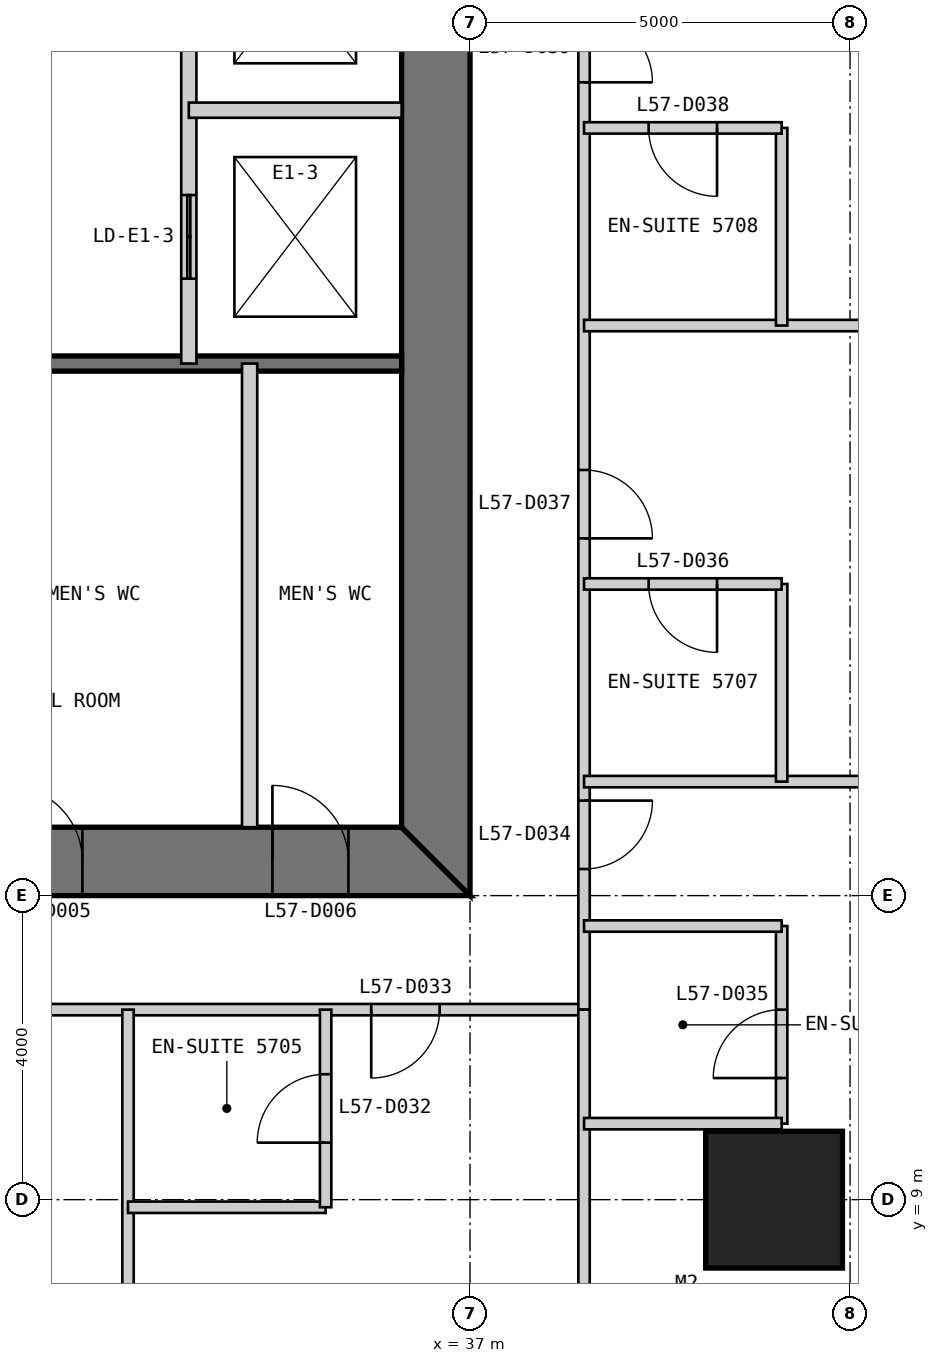
"""IFC4 building model, lengths in metres.
Left out: names, types, materials, properties, quantities, classifications, styles, units other than length and angle.
Written with IfcOpenShell. Run it as: python <this file> out.ifc"""

import sys

from ifc_helpers import new_model, si_unit, direction, frame, frame_2d, origin, origin_2d, place, context, subcontext, project, spatial, polyline, rectangle, outline, extrude, element, fill, save


model = new_model("IFC4")
c1 = context("Model", 3, precision=1e-05, world=origin(), true_north=direction((0.0, 1.0)))
c2 = subcontext(c1, "Body", "Model", "MODEL_VIEW")
j1 = project(units=[si_unit("LENGTHUNIT", "METRE"), si_unit("PLANEANGLEUNIT", "RADIAN")], contexts=[c1])
p1 = place(None, origin())
s1 = spatial("IfcSite", under=j1, at=p1, CompositionType="ELEMENT")
p2 = place(p1, origin())
s2 = spatial("IfcBuilding", under=s1, at=p2, CompositionType="ELEMENT")
p3 = place(p2, frame((0.0, 0.0, 245.8)))
s3 = spatial("IfcBuildingStorey", under=s2, at=p3, CompositionType="ELEMENT", Elevation=245.8)
p4 = place(p3, frame((41.0, 9.0, 0.0), z_axis=(0.0, 0.0, 1.0), x_axis=(1.0, 0.0, 0.0)))
e1 = element("IfcColumn", 1, at=p4, inside=s3, PredefinedType="COLUMN", context=c2, shape_type="SweptSolid", body=[
    extrude(rectangle(XDim=1.8, YDim=1.8, at=origin_2d()), origin(), (0.0, 0.0, 1.0), 3.4),
])
p5 = place(p3, frame((13.0, 13.45, 0.0), z_axis=(0.0, 0.0, 1.0), x_axis=(1.0, 0.0, 0.0)))
e2 = element("IfcWall", 2, at=p5, inside=s3, PredefinedType="SHEAR", context=c2, shape_type="SweptSolid", body=[
    extrude(outline(polyline([(0.0, -0.45), (24.0, -0.45), (23.1, 0.45), (0.9, 0.45), (0.0, -0.45)])), origin(), (0.0, 0.0, 1.0), 3.4),
])
p6 = place(p5, frame((4.9, 0.0, 0.0)))
e3 = element("IfcOpeningElement", 3, at=p6, cuts=e2, PredefinedType="OPENING", context=c2, shape_type="SweptSolid", body=[
    extrude(rectangle(XDim=1.0, YDim=2.2, at=frame_2d((0.5, 1.1))), frame((0.0, 0.46, 0.0), z_axis=(0.0, -1.0, 0.0), x_axis=(1.0, 0.0, 0.0)), (0.0, 0.0, 1.0), 0.92),
])
p7 = place(p5, frame((8.9, 0.0, 0.0)))
e4 = element("IfcOpeningElement", 4, at=p7, cuts=e2, PredefinedType="OPENING", context=c2, shape_type="SweptSolid", body=[
    extrude(rectangle(XDim=1.1, YDim=2.2, at=frame_2d((0.55, 1.1))), frame((0.0, 0.46, 0.0), z_axis=(0.0, -1.0, 0.0), x_axis=(1.0, 0.0, 0.0)), (0.0, 0.0, 1.0), 0.92),
])
p8 = place(p5, frame((15.05, 0.0, 0.0)))
e5 = element("IfcOpeningElement", 5, at=p8, cuts=e2, PredefinedType="OPENING", context=c2, shape_type="SweptSolid", body=[
    extrude(rectangle(XDim=0.9, YDim=2.2, at=frame_2d((0.45, 1.1))), frame((0.0, 0.46, 0.0), z_axis=(0.0, -1.0, 0.0), x_axis=(1.0, 0.0, 0.0)), (0.0, 0.0, 1.0), 0.92),
])
p9 = place(p5, frame((17.9, 0.0, 0.0)))
e6 = element("IfcOpeningElement", 6, at=p9, cuts=e2, PredefinedType="OPENING", context=c2, shape_type="SweptSolid", body=[
    extrude(rectangle(XDim=1.0, YDim=2.2, at=frame_2d((0.5, 1.1))), frame((0.0, 0.46, 0.0), z_axis=(0.0, -1.0, 0.0), x_axis=(1.0, 0.0, 0.0)), (0.0, 0.0, 1.0), 0.92),
])
p10 = place(p5, frame((21.4, 0.0, 0.0)))
e7 = element("IfcOpeningElement", 7, at=p10, cuts=e2, PredefinedType="OPENING", context=c2, shape_type="SweptSolid", body=[
    extrude(rectangle(XDim=1.0, YDim=2.2, at=frame_2d((0.5, 1.1))), frame((0.0, 0.46, 0.0), z_axis=(0.0, -1.0, 0.0), x_axis=(1.0, 0.0, 0.0)), (0.0, 0.0, 1.0), 0.92),
])
p11 = place(p3, frame((36.55, 13.9, 0.0), z_axis=(0.0, 0.0, 1.0), x_axis=(0.0, 1.0, 0.0)))
e8 = element("IfcWall", 8, at=p11, inside=s3, PredefinedType="SHEAR", context=c2, shape_type="SweptSolid", body=[
    extrude(outline(polyline([(-0.9, -0.45), (23.1, -0.45), (22.2, 0.45), (0.0, 0.45), (-0.9, -0.45)])), origin(), (0.0, 0.0, 1.0), 3.4),
])
p12 = place(p11, frame((20.2, 0.0, 0.0)))
e9 = element("IfcOpeningElement", 9, at=p12, cuts=e8, PredefinedType="OPENING", context=c2, shape_type="SweptSolid", body=[
    extrude(rectangle(XDim=1.0, YDim=2.2, at=frame_2d((0.5, 1.1))), frame((0.0, 0.46, 0.0), z_axis=(0.0, -1.0, 0.0), x_axis=(1.0, 0.0, 0.0)), (0.0, 0.0, 1.0), 0.92),
])
p13 = place(p11, frame((17.25, 0.0, 0.0)))
e10 = element("IfcOpeningElement", 10, at=p13, cuts=e8, PredefinedType="OPENING", context=c2, shape_type="SweptSolid", body=[
    extrude(rectangle(XDim=0.9, YDim=2.2, at=frame_2d((0.45, 1.1))), frame((0.0, 0.46, 0.0), z_axis=(0.0, -1.0, 0.0), x_axis=(1.0, 0.0, 0.0)), (0.0, 0.0, 1.0), 0.92),
])
p14 = place(p3, frame((20.3, 20.0, 0.0), z_axis=(0.0, 0.0, 1.0), x_axis=(1.0, 0.0, 0.0)))
e11 = element("IfcWall", 11, at=p14, inside=s3, PredefinedType="SOLIDWALL", context=c2, shape_type="SweptSolid", body=[
    extrude(rectangle(XDim=15.8, YDim=0.2, at=frame_2d((7.9, 0.0))), origin(), (0.0, 0.0, 1.0), 3.2),
])
p15 = place(p3, frame((34.1, 13.9, 0.0), z_axis=(0.0, 0.0, 1.0), x_axis=(0.0, 1.0, 0.0)))
e12 = element("IfcWall", 12, at=p15, inside=s3, PredefinedType="PARTITIONING", context=c2, shape_type="SweptSolid", body=[
    extrude(rectangle(XDim=6.1, YDim=0.2, at=frame_2d((3.05, 0.0))), origin(), (0.0, 0.0, 1.0), 3.2),
])
p16 = place(p3, frame((33.3, 36.1, 0.0), z_axis=(0.0, 0.0, 1.0), x_axis=(0.0, -1.0, 0.0)))
e13 = element("IfcWall", 13, at=p16, inside=s3, PredefinedType="PARTITIONING", context=c2, shape_type="SweptSolid", body=[
    extrude(rectangle(XDim=16.1, YDim=0.2, at=frame_2d((8.05, 0.0))), origin(), (0.0, 0.0, 1.0), 3.2),
])
p17 = place(p16, frame((7.217, 0.0, 0.0)))
e14 = element("IfcOpeningElement", 14, at=p17, cuts=e13, PredefinedType="OPENING", context=c2, shape_type="SweptSolid", body=[
    extrude(rectangle(XDim=1.1, YDim=2.2, at=frame_2d((0.55, 1.1))), frame((0.0, 0.11, 0.0), z_axis=(0.0, -1.0, 0.0), x_axis=(1.0, 0.0, 0.0)), (0.0, 0.0, 1.0), 0.22),
])
p18 = place(p16, frame((10.55, 0.0, 0.0)))
e15 = element("IfcOpeningElement", 15, at=p18, cuts=e13, PredefinedType="OPENING", context=c2, shape_type="SweptSolid", body=[
    extrude(rectangle(XDim=1.1, YDim=2.2, at=frame_2d((0.55, 1.1))), frame((0.0, 0.11, 0.0), z_axis=(0.0, -1.0, 0.0), x_axis=(1.0, 0.0, 0.0)), (0.0, 0.0, 1.0), 0.22),
])
p19 = place(p16, frame((13.883, 0.0, 0.0)))
e16 = element("IfcOpeningElement", 16, at=p19, cuts=e13, PredefinedType="OPENING", context=c2, shape_type="SweptSolid", body=[
    extrude(rectangle(XDim=1.1, YDim=2.2, at=frame_2d((0.55, 1.1))), frame((0.0, 0.11, 0.0), z_axis=(0.0, -1.0, 0.0), x_axis=(1.0, 0.0, 0.0)), (0.0, 0.0, 1.0), 0.22),
])
p20 = place(p3, frame((36.1, 23.333, 0.0), z_axis=(0.0, 0.0, 1.0), x_axis=(-1.0, 0.0, 0.0)))
e17 = element("IfcWall", 17, at=p20, inside=s3, PredefinedType="PARTITIONING", context=c2, shape_type="SweptSolid", body=[
    extrude(rectangle(XDim=2.8, YDim=0.2, at=frame_2d((1.4, 0.0))), origin(), (0.0, 0.0, 1.0), 3.2),
])
p21 = place(p3, frame((11.5, 11.5, 0.0), z_axis=(0.0, 0.0, 1.0), x_axis=(1.0, 0.0, 0.0)))
e18 = element("IfcWall", 18, at=p21, inside=s3, PredefinedType="PARTITIONING", context=c2, shape_type="SweptSolid", body=[
    extrude(rectangle(XDim=27.0, YDim=0.15, at=frame_2d((13.5, 0.0))), origin(), (0.0, 0.0, 1.0), 3.25),
])
p22 = place(p21, frame((1.85, 0.0, 0.0)))
e19 = element("IfcOpeningElement", 19, at=p22, cuts=e18, PredefinedType="OPENING", context=c2, shape_type="SweptSolid", body=[
    extrude(rectangle(XDim=0.9, YDim=2.1, at=frame_2d((0.45, 1.05))), frame((0.0, 0.085, 0.0), z_axis=(0.0, -1.0, 0.0), x_axis=(1.0, 0.0, 0.0)), (0.0, 0.0, 1.0), 0.17),
])
p23 = place(p21, frame((6.2, 0.0, 0.0)))
e20 = element("IfcOpeningElement", 20, at=p23, cuts=e18, PredefinedType="OPENING", context=c2, shape_type="SweptSolid", body=[
    extrude(rectangle(XDim=0.9, YDim=2.1, at=frame_2d((0.45, 1.05))), frame((0.0, 0.085, 0.0), z_axis=(0.0, -1.0, 0.0), x_axis=(1.0, 0.0, 0.0)), (0.0, 0.0, 1.0), 0.17),
])
p24 = place(p21, frame((12.2, 0.0, 0.0)))
e21 = element("IfcOpeningElement", 21, at=p24, cuts=e18, PredefinedType="OPENING", context=c2, shape_type="SweptSolid", body=[
    extrude(rectangle(XDim=0.9, YDim=2.1, at=frame_2d((0.45, 1.05))), frame((0.0, 0.085, 0.0), z_axis=(0.0, -1.0, 0.0), x_axis=(1.0, 0.0, 0.0)), (0.0, 0.0, 1.0), 0.17),
])
p25 = place(p21, frame((18.8, 0.0, 0.0)))
e22 = element("IfcOpeningElement", 22, at=p25, cuts=e18, PredefinedType="OPENING", context=c2, shape_type="SweptSolid", body=[
    extrude(rectangle(XDim=1.0, YDim=2.1, at=frame_2d((0.5, 1.05))), frame((0.0, 0.085, 0.0), z_axis=(0.0, -1.0, 0.0), x_axis=(1.0, 0.0, 0.0)), (0.0, 0.0, 1.0), 0.17),
])
p26 = place(p21, frame((24.2, 0.0, 0.0)))
e23 = element("IfcOpeningElement", 23, at=p26, cuts=e18, PredefinedType="OPENING", context=c2, shape_type="SweptSolid", body=[
    extrude(rectangle(XDim=0.9, YDim=2.1, at=frame_2d((0.45, 1.05))), frame((0.0, 0.085, 0.0), z_axis=(0.0, -1.0, 0.0), x_axis=(1.0, 0.0, 0.0)), (0.0, 0.0, 1.0), 0.17),
])
p27 = place(p3, frame((32.5, 0.15, 0.0), z_axis=(0.0, 0.0, 1.0), x_axis=(0.0, 1.0, 0.0)))
e24 = element("IfcWall", 24, at=p27, inside=s3, PredefinedType="PARTITIONING", context=c2, shape_type="SweptSolid", body=[
    extrude(rectangle(XDim=11.35, YDim=0.15, at=frame_2d((5.675, 0.0))), origin(), (0.0, 0.0, 1.0), 3.25),
])
p28 = place(p3, frame((32.5, 8.9, 0.0), z_axis=(0.0, 0.0, 1.0), x_axis=(1.0, 0.0, 0.0)))
e25 = element("IfcWall", 25, at=p28, inside=s3, PredefinedType="PARTITIONING", context=c2, shape_type="SweptSolid", body=[
    extrude(rectangle(XDim=2.6, YDim=0.15, at=frame_2d((1.3, 0.0))), origin(), (0.0, 0.0, 1.0), 3.25),
])
p29 = place(p3, frame((35.1, 8.9, 0.0), z_axis=(0.0, 0.0, 1.0), x_axis=(0.0, 1.0, 0.0)))
e26 = element("IfcWall", 26, at=p29, inside=s3, PredefinedType="PARTITIONING", context=c2, shape_type="SweptSolid", body=[
    extrude(rectangle(XDim=2.6, YDim=0.15, at=frame_2d((1.3, 0.0))), origin(), (0.0, 0.0, 1.0), 3.25),
])
p30 = place(p29, frame((0.85, 0.0, 0.0)))
e27 = element("IfcOpeningElement", 27, at=p30, cuts=e26, PredefinedType="OPENING", context=c2, shape_type="SweptSolid", body=[
    extrude(rectangle(XDim=0.9, YDim=2.1, at=frame_2d((0.45, 1.05))), frame((0.0, 0.085, 0.0), z_axis=(0.0, -1.0, 0.0), x_axis=(1.0, 0.0, 0.0)), (0.0, 0.0, 1.0), 0.17),
])
p31 = place(p3, frame((38.5, 11.5, 0.0), z_axis=(0.0, 0.0, 1.0), x_axis=(0.0, 1.0, 0.0)))
e28 = element("IfcWall", 28, at=p31, inside=s3, PredefinedType="PARTITIONING", context=c2, shape_type="SweptSolid", body=[
    extrude(rectangle(XDim=27.0, YDim=0.15, at=frame_2d((13.5, 0.0))), origin(), (0.0, 0.0, 1.0), 3.25),
])
p32 = place(p31, frame((1.85, 0.0, 0.0)))
e29 = element("IfcOpeningElement", 29, at=p32, cuts=e28, PredefinedType="OPENING", context=c2, shape_type="SweptSolid", body=[
    extrude(rectangle(XDim=0.9, YDim=2.1, at=frame_2d((0.45, 1.05))), frame((0.0, 0.085, 0.0), z_axis=(0.0, -1.0, 0.0), x_axis=(1.0, 0.0, 0.0)), (0.0, 0.0, 1.0), 0.17),
])
p33 = place(p31, frame((6.2, 0.0, 0.0)))
e30 = element("IfcOpeningElement", 30, at=p33, cuts=e28, PredefinedType="OPENING", context=c2, shape_type="SweptSolid", body=[
    extrude(rectangle(XDim=0.9, YDim=2.1, at=frame_2d((0.45, 1.05))), frame((0.0, 0.085, 0.0), z_axis=(0.0, -1.0, 0.0), x_axis=(1.0, 0.0, 0.0)), (0.0, 0.0, 1.0), 0.17),
])
p34 = place(p31, frame((12.2, 0.0, 0.0)))
e31 = element("IfcOpeningElement", 31, at=p34, cuts=e28, PredefinedType="OPENING", context=c2, shape_type="SweptSolid", body=[
    extrude(rectangle(XDim=0.9, YDim=2.1, at=frame_2d((0.45, 1.05))), frame((0.0, 0.085, 0.0), z_axis=(0.0, -1.0, 0.0), x_axis=(1.0, 0.0, 0.0)), (0.0, 0.0, 1.0), 0.17),
])
p35 = place(p31, frame((18.2, 0.0, 0.0)))
e32 = element("IfcOpeningElement", 32, at=p35, cuts=e28, PredefinedType="OPENING", context=c2, shape_type="SweptSolid", body=[
    extrude(rectangle(XDim=0.9, YDim=2.1, at=frame_2d((0.45, 1.05))), frame((0.0, 0.085, 0.0), z_axis=(0.0, -1.0, 0.0), x_axis=(1.0, 0.0, 0.0)), (0.0, 0.0, 1.0), 0.17),
])
p36 = place(p31, frame((24.2, 0.0, 0.0)))
e33 = element("IfcOpeningElement", 33, at=p36, cuts=e28, PredefinedType="OPENING", context=c2, shape_type="SweptSolid", body=[
    extrude(rectangle(XDim=0.9, YDim=2.1, at=frame_2d((0.45, 1.05))), frame((0.0, 0.085, 0.0), z_axis=(0.0, -1.0, 0.0), x_axis=(1.0, 0.0, 0.0)), (0.0, 0.0, 1.0), 0.17),
])
p37 = place(p3, frame((38.5, 0.15, 0.0), z_axis=(0.0, 0.0, 1.0), x_axis=(0.0, 1.0, 0.0)))
e34 = element("IfcWall", 34, at=p37, inside=s3, PredefinedType="PARTITIONING", context=c2, shape_type="SweptSolid", body=[
    extrude(rectangle(XDim=11.35, YDim=0.15, at=frame_2d((5.675, 0.0))), origin(), (0.0, 0.0, 1.0), 3.25),
])
p38 = place(p3, frame((41.1, 10.0, 0.0), z_axis=(0.0, 0.0, 1.0), x_axis=(0.0, 1.0, 0.0)))
e35 = element("IfcWall", 35, at=p38, inside=s3, PredefinedType="PARTITIONING", context=c2, shape_type="SweptSolid", body=[
    extrude(rectangle(XDim=2.6, YDim=0.15, at=frame_2d((1.3, 0.0))), origin(), (0.0, 0.0, 1.0), 2.638),
])
p39 = place(p38, frame((0.6, 0.0, 0.0)))
e36 = element("IfcOpeningElement", 36, at=p39, cuts=e35, PredefinedType="OPENING", context=c2, shape_type="SweptSolid", body=[
    extrude(rectangle(XDim=0.9, YDim=2.1, at=frame_2d((0.45, 1.05))), frame((0.0, 0.085, 0.0), z_axis=(0.0, -1.0, 0.0), x_axis=(1.0, 0.0, 0.0)), (0.0, 0.0, 1.0), 0.17),
])
for number, where, z_axis, x_axis in (
    (37, (41.1, 10.0, 0.0), (0.0, 0.0, 1.0), (-1.0, 0.0, 0.0)),
    (38, (41.1, 12.6, 0.0), (0.0, 0.0, 1.0), (-1.0, 0.0, 0.0)),
):
    element("IfcWall", number, at=place(p3, frame(where, z_axis=z_axis, x_axis=x_axis)), inside=s3, PredefinedType="PARTITIONING", context=c2, shape_type="SweptSolid", body=[
        extrude(rectangle(XDim=2.6, YDim=0.15, at=frame_2d((1.3, 0.0))), origin(), (0.0, 0.0, 1.0), 3.25),
    ])
p40 = place(p3, frame((49.85, 14.5, 0.0), z_axis=(0.0, 0.0, 1.0), x_axis=(-1.0, 0.0, 0.0)))
e39 = element("IfcWall", 39, at=p40, inside=s3, PredefinedType="PARTITIONING", context=c2, shape_type="SweptSolid", body=[
    extrude(rectangle(XDim=11.35, YDim=0.15, at=frame_2d((5.675, 0.0))), origin(), (0.0, 0.0, 1.0), 3.25),
])
p41 = place(p3, frame((41.1, 14.5, 0.0), z_axis=(0.0, 0.0, 1.0), x_axis=(0.0, 1.0, 0.0)))
e40 = element("IfcWall", 40, at=p41, inside=s3, PredefinedType="PARTITIONING", context=c2, shape_type="SweptSolid", body=[
    extrude(rectangle(XDim=2.6, YDim=0.15, at=frame_2d((1.3, 0.0))), origin(), (0.0, 0.0, 1.0), 3.25),
])
p42 = place(p3, frame((41.1, 17.1, 0.0), z_axis=(0.0, 0.0, 1.0), x_axis=(-1.0, 0.0, 0.0)))
e41 = element("IfcWall", 41, at=p42, inside=s3, PredefinedType="PARTITIONING", context=c2, shape_type="SweptSolid", body=[
    extrude(rectangle(XDim=2.6, YDim=0.15, at=frame_2d((1.3, 0.0))), origin(), (0.0, 0.0, 1.0), 3.25),
])
p43 = place(p42, frame((0.85, 0.0, 0.0)))
e42 = element("IfcOpeningElement", 42, at=p43, cuts=e41, PredefinedType="OPENING", context=c2, shape_type="SweptSolid", body=[
    extrude(rectangle(XDim=0.9, YDim=2.1, at=frame_2d((0.45, 1.05))), frame((0.0, 0.085, 0.0), z_axis=(0.0, -1.0, 0.0), x_axis=(1.0, 0.0, 0.0)), (0.0, 0.0, 1.0), 0.17),
])
p44 = place(p3, frame((49.85, 20.5, 0.0), z_axis=(0.0, 0.0, 1.0), x_axis=(-1.0, 0.0, 0.0)))
e43 = element("IfcWall", 43, at=p44, inside=s3, PredefinedType="PARTITIONING", context=c2, shape_type="SweptSolid", body=[
    extrude(rectangle(XDim=11.35, YDim=0.15, at=frame_2d((5.675, 0.0))), origin(), (0.0, 0.0, 1.0), 3.25),
])
p45 = place(p3, frame((41.1, 20.5, 0.0), z_axis=(0.0, 0.0, 1.0), x_axis=(0.0, 1.0, 0.0)))
e44 = element("IfcWall", 44, at=p45, inside=s3, PredefinedType="PARTITIONING", context=c2, shape_type="SweptSolid", body=[
    extrude(rectangle(XDim=2.6, YDim=0.15, at=frame_2d((1.3, 0.0))), origin(), (0.0, 0.0, 1.0), 3.25),
])
p46 = place(p3, frame((41.1, 23.1, 0.0), z_axis=(0.0, 0.0, 1.0), x_axis=(-1.0, 0.0, 0.0)))
e45 = element("IfcWall", 45, at=p46, inside=s3, PredefinedType="PARTITIONING", context=c2, shape_type="SweptSolid", body=[
    extrude(rectangle(XDim=2.6, YDim=0.15, at=frame_2d((1.3, 0.0))), origin(), (0.0, 0.0, 1.0), 3.25),
])
p47 = place(p46, frame((0.85, 0.0, 0.0)))
e46 = element("IfcOpeningElement", 46, at=p47, cuts=e45, PredefinedType="OPENING", context=c2, shape_type="SweptSolid", body=[
    extrude(rectangle(XDim=0.9, YDim=2.1, at=frame_2d((0.45, 1.05))), frame((0.0, 0.085, 0.0), z_axis=(0.0, -1.0, 0.0), x_axis=(1.0, 0.0, 0.0)), (0.0, 0.0, 1.0), 0.17),
])
p48 = place(p9, origin())
e47 = element("IfcDoor", 47, at=p48, inside=s3, OperationType="SINGLE_SWING_LEFT", PredefinedType="DOOR", context=c2, shape_type="SweptSolid", body=[
    extrude(rectangle(XDim=1.0, YDim=2.2, at=frame_2d((0.5, 1.1))), frame((0.0, 0.025, 0.0), z_axis=(0.0, -1.0, 0.0), x_axis=(1.0, 0.0, 0.0)), (0.0, 0.0, 1.0), 0.05),
    extrude(outline(polyline([(0.0, 0.0), (0.04, 0.0), (0.04, 2.16), (0.96, 2.16), (0.96, 0.0), (1.0, 0.0), (1.0, 2.2), (0.0, 2.2), (0.0, 0.0)])), frame((0.0, 0.3, 0.0), z_axis=(0.0, -1.0, 0.0), x_axis=(1.0, 0.0, 0.0)), (0.0, 0.0, 1.0), 0.6),
])
fill(e6, e47)
p49 = place(p10, origin())
e48 = element("IfcDoor", 48, at=p49, inside=s3, OperationType="SINGLE_SWING_LEFT", PredefinedType="DOOR", context=c2, shape_type="SweptSolid", body=[
    extrude(rectangle(XDim=1.0, YDim=2.2, at=frame_2d((0.5, 1.1))), frame((0.0, 0.025, 0.0), z_axis=(0.0, -1.0, 0.0), x_axis=(1.0, 0.0, 0.0)), (0.0, 0.0, 1.0), 0.05),
    extrude(outline(polyline([(0.0, 0.0), (0.04, 0.0), (0.04, 2.16), (0.96, 2.16), (0.96, 0.0), (1.0, 0.0), (1.0, 2.2), (0.0, 2.2), (0.0, 0.0)])), frame((0.0, 0.3, 0.0), z_axis=(0.0, -1.0, 0.0), x_axis=(1.0, 0.0, 0.0)), (0.0, 0.0, 1.0), 0.6),
])
fill(e7, e48)
p50 = place(p30, origin())
e49 = element("IfcDoor", 49, at=p50, inside=s3, OperationType="SINGLE_SWING_LEFT", PredefinedType="DOOR", context=c2, shape_type="SweptSolid", body=[
    extrude(rectangle(XDim=0.9, YDim=2.1, at=frame_2d((0.45, 1.05))), frame((0.0, 0.025, 0.0), z_axis=(0.0, -1.0, 0.0), x_axis=(1.0, 0.0, 0.0)), (0.0, 0.0, 1.0), 0.05),
])
fill(e27, e49)
p51 = place(p26, frame((0.9, 0.0, 0.0), z_axis=(0.0, 0.0, 1.0), x_axis=(-1.0, 0.0, 0.0)))
e50 = element("IfcDoor", 50, at=p51, inside=s3, OperationType="SINGLE_SWING_RIGHT", PredefinedType="DOOR", context=c2, shape_type="SweptSolid", body=[
    extrude(rectangle(XDim=0.9, YDim=2.1, at=frame_2d((0.45, 1.05))), frame((0.0, 0.025, 0.0), z_axis=(0.0, -1.0, 0.0), x_axis=(1.0, 0.0, 0.0)), (0.0, 0.0, 1.0), 0.05),
])
fill(e23, e50)
p52 = place(p32, frame((0.9, 0.0, 0.0), z_axis=(0.0, 0.0, 1.0), x_axis=(-1.0, 0.0, 0.0)))
e51 = element("IfcDoor", 51, at=p52, inside=s3, OperationType="SINGLE_SWING_LEFT", PredefinedType="DOOR", context=c2, shape_type="SweptSolid", body=[
    extrude(rectangle(XDim=0.9, YDim=2.1, at=frame_2d((0.45, 1.05))), frame((0.0, 0.025, 0.0), z_axis=(0.0, -1.0, 0.0), x_axis=(1.0, 0.0, 0.0)), (0.0, 0.0, 1.0), 0.05),
])
fill(e29, e51)
p53 = place(p39, origin())
e52 = element("IfcDoor", 52, at=p53, inside=s3, OperationType="SINGLE_SWING_LEFT", PredefinedType="DOOR", context=c2, shape_type="SweptSolid", body=[
    extrude(rectangle(XDim=0.9, YDim=2.1, at=frame_2d((0.45, 1.05))), frame((0.0, 0.025, 0.0), z_axis=(0.0, -1.0, 0.0), x_axis=(1.0, 0.0, 0.0)), (0.0, 0.0, 1.0), 0.05),
])
fill(e36, e52)
p54 = place(p43, origin())
e53 = element("IfcDoor", 53, at=p54, inside=s3, OperationType="SINGLE_SWING_LEFT", PredefinedType="DOOR", context=c2, shape_type="SweptSolid", body=[
    extrude(rectangle(XDim=0.9, YDim=2.1, at=frame_2d((0.45, 1.05))), frame((0.0, 0.025, 0.0), z_axis=(0.0, -1.0, 0.0), x_axis=(1.0, 0.0, 0.0)), (0.0, 0.0, 1.0), 0.05),
])
fill(e42, e53)
p55 = place(p33, frame((0.9, 0.0, 0.0), z_axis=(0.0, 0.0, 1.0), x_axis=(-1.0, 0.0, 0.0)))
e54 = element("IfcDoor", 54, at=p55, inside=s3, OperationType="SINGLE_SWING_RIGHT", PredefinedType="DOOR", context=c2, shape_type="SweptSolid", body=[
    extrude(rectangle(XDim=0.9, YDim=2.1, at=frame_2d((0.45, 1.05))), frame((0.0, 0.025, 0.0), z_axis=(0.0, -1.0, 0.0), x_axis=(1.0, 0.0, 0.0)), (0.0, 0.0, 1.0), 0.05),
])
fill(e30, e54)
p56 = place(p47, origin())
e55 = element("IfcDoor", 55, at=p56, inside=s3, OperationType="SINGLE_SWING_LEFT", PredefinedType="DOOR", context=c2, shape_type="SweptSolid", body=[
    extrude(rectangle(XDim=0.9, YDim=2.1, at=frame_2d((0.45, 1.05))), frame((0.0, 0.025, 0.0), z_axis=(0.0, -1.0, 0.0), x_axis=(1.0, 0.0, 0.0)), (0.0, 0.0, 1.0), 0.05),
])
fill(e46, e55)
p57 = place(p34, frame((0.9, 0.0, 0.0), z_axis=(0.0, 0.0, 1.0), x_axis=(-1.0, 0.0, 0.0)))
e56 = element("IfcDoor", 56, at=p57, inside=s3, OperationType="SINGLE_SWING_RIGHT", PredefinedType="DOOR", context=c2, shape_type="SweptSolid", body=[
    extrude(rectangle(XDim=0.9, YDim=2.1, at=frame_2d((0.45, 1.05))), frame((0.0, 0.025, 0.0), z_axis=(0.0, -1.0, 0.0), x_axis=(1.0, 0.0, 0.0)), (0.0, 0.0, 1.0), 0.05),
])
fill(e31, e56)
p58 = place(p19, origin())
e57 = element("IfcDoor", 57, at=p58, inside=s3, OperationType="DOUBLE_DOOR_SLIDING", PredefinedType="DOOR", context=c2, shape_type="SweptSolid", body=[
    extrude(rectangle(XDim=1.1, YDim=2.2, at=frame_2d((0.55, 1.1))), frame((0.0, 0.025, 0.0), z_axis=(0.0, -1.0, 0.0), x_axis=(1.0, 0.0, 0.0)), (0.0, 0.0, 1.0), 0.05),
])
fill(e16, e57)
save(model, sys.argv[1])
